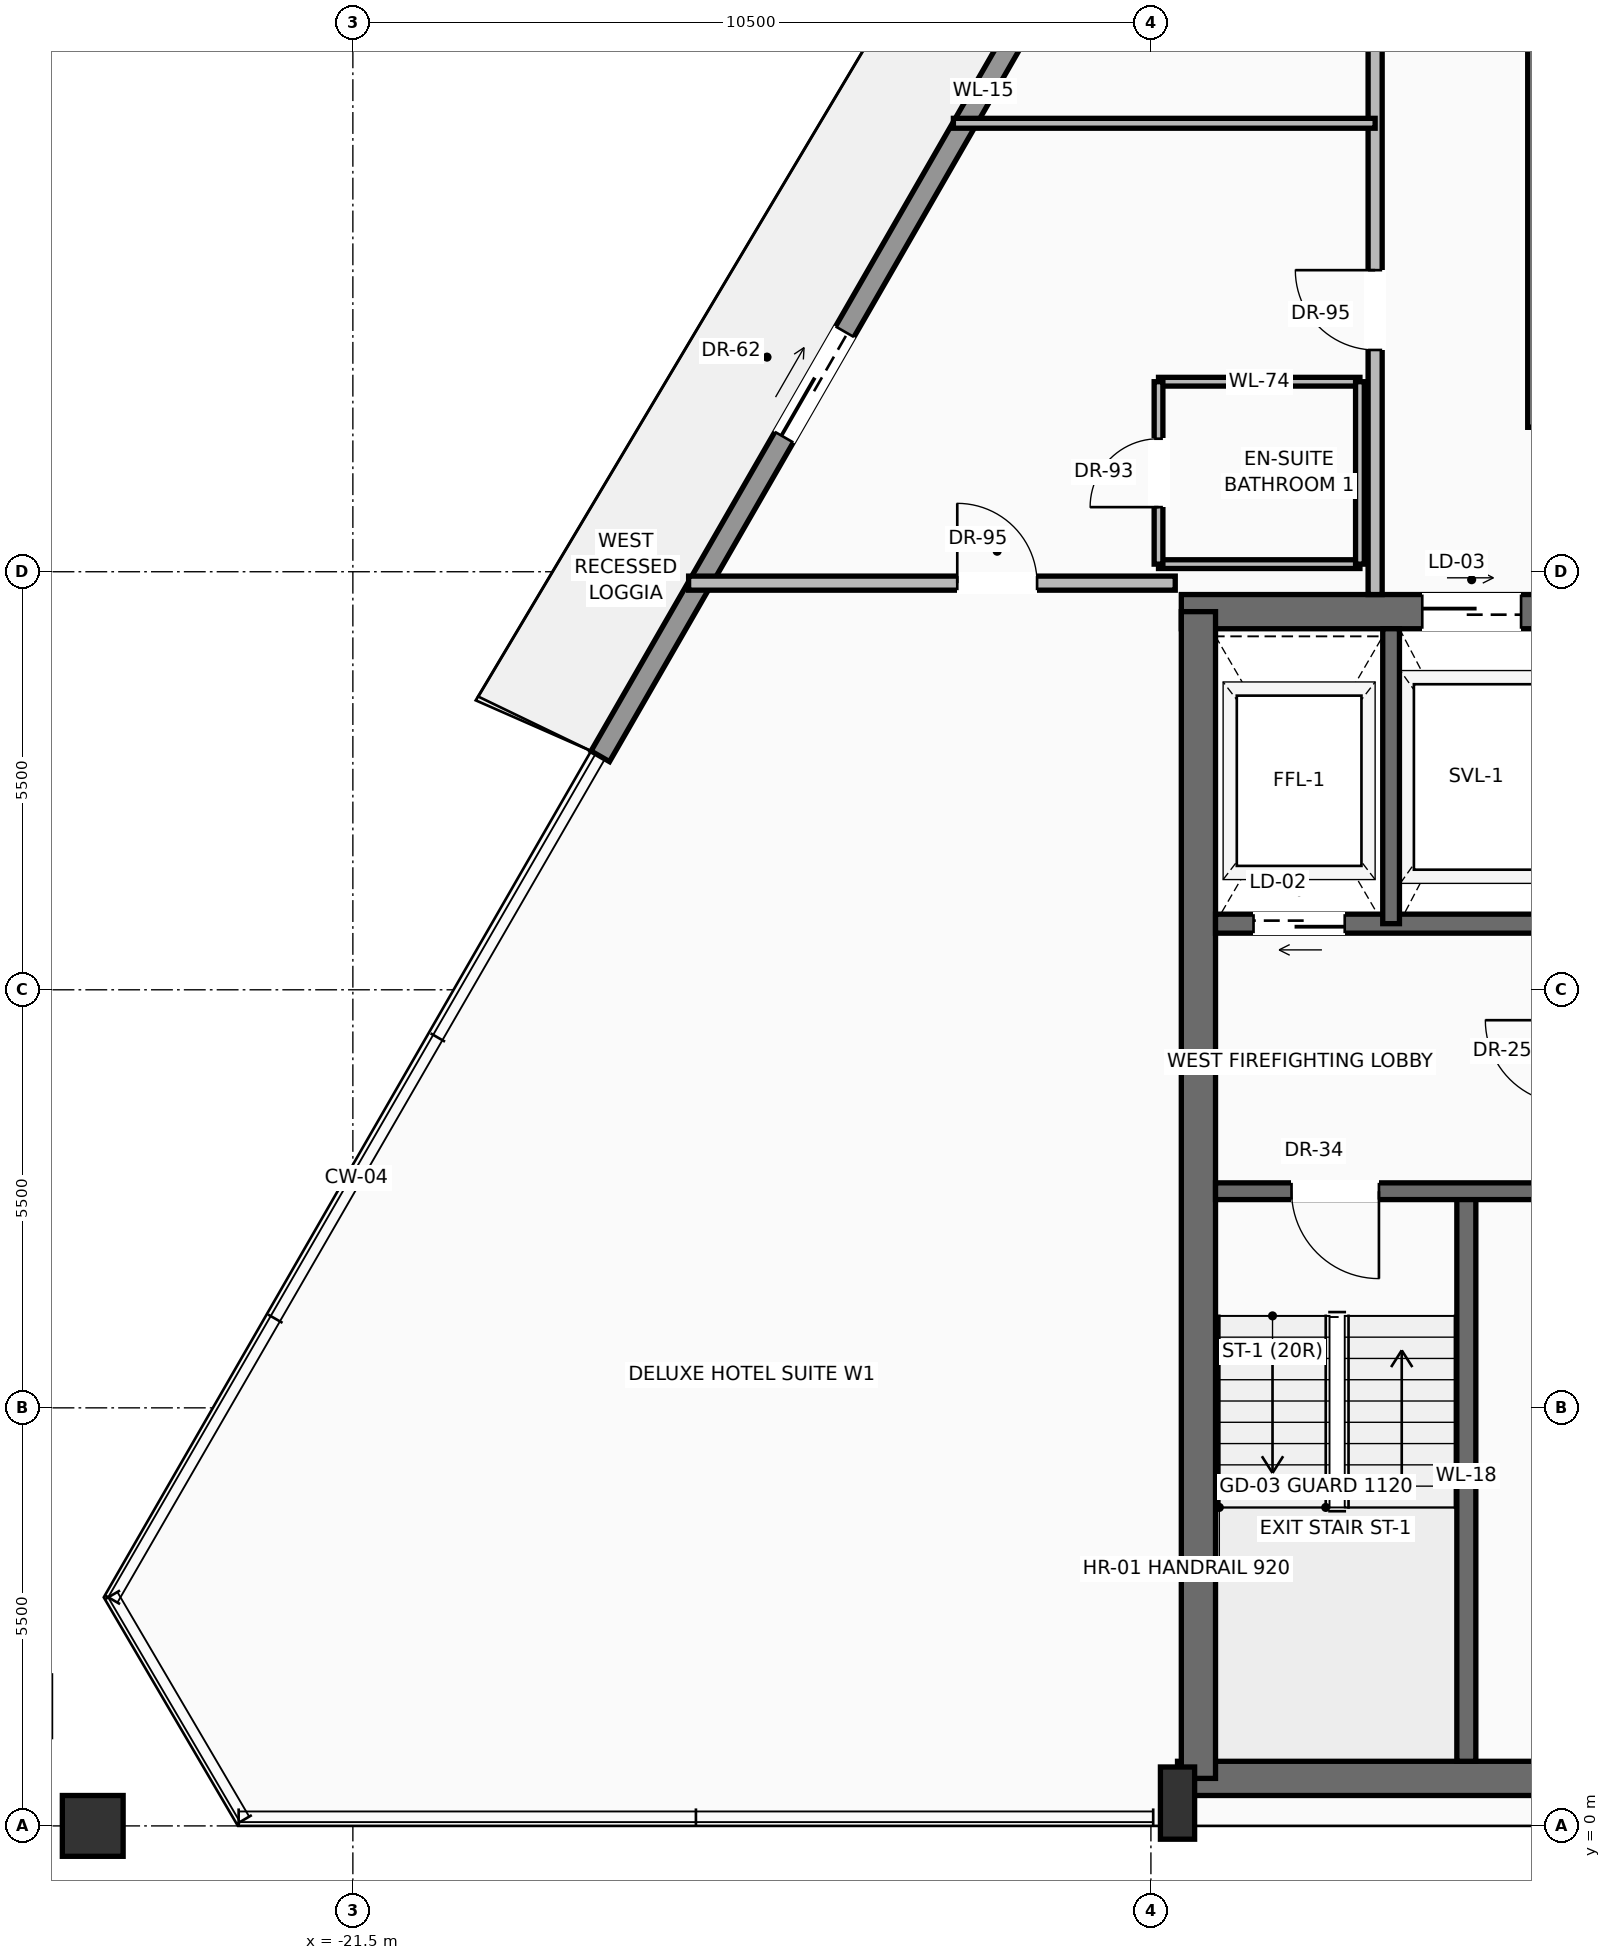
"""IFC4 building model, lengths in metres.
Left out: names, types, materials, properties, quantities, classifications, styles, units other than length and angle.
Written with IfcOpenShell. Run it as: python <this file> out.ifc"""

import sys

from ifc_helpers import new_model, si_unit, direction, frame, frame_2d, origin, origin_2d, place, context, subcontext, project, spatial, rectangle, hollow_rectangle, extrude, source, transform, mapped, element, fill, save


model = new_model("IFC4")
c1 = context("Model", 3, precision=1e-05, world=origin(), true_north=direction((0.0, 1.0)))
c2 = subcontext(c1, "Body", "Model", "MODEL_VIEW")
j1 = project(units=[si_unit("LENGTHUNIT", "METRE"), si_unit("PLANEANGLEUNIT", "RADIAN")], contexts=[c1])
p1 = place(None, origin())
s1 = spatial("IfcSite", under=j1, at=p1, CompositionType="ELEMENT")
p2 = place(p1, origin())
s2 = spatial("IfcBuilding", under=s1, at=p2, CompositionType="ELEMENT")
p3 = place(p2, frame((0.0, 0.0, 283.35)))
s3 = spatial("IfcBuildingStorey", under=s2, at=p3, CompositionType="ELEMENT", Elevation=283.35)
p4 = place(p3, frame((-10.65, 0.625, 0.0), z_axis=(0.0, 0.0, 1.0), x_axis=(1.0, 0.0, 0.0)))
e1 = element("IfcWall", 1, at=p4, inside=s3, PredefinedType="SHEAR", context=c2, shape_type="SweptSolid", body=[
    extrude(rectangle(XDim=21.3, YDim=0.45, at=frame_2d((10.65, 0.0))), origin(), (0.0, 0.0, 1.0), 3.24),
])
p5 = place(p3, frame((-10.6, 15.975, 0.0), z_axis=(0.0, 0.0, 1.0), x_axis=(1.0, 0.0, 0.0)))
e2 = element("IfcWall", 2, at=p5, inside=s3, PredefinedType="SHEAR", context=c2, shape_type="SweptSolid", body=[
    extrude(rectangle(XDim=21.2, YDim=0.45, at=frame_2d((10.6, 0.0))), origin(), (0.0, 0.0, 1.0), 3.24),
])
p6 = place(p5, frame((3.17, 0.0, 0.0)))
e3 = element("IfcOpeningElement", 3, at=p6, cuts=e2, PredefinedType="OPENING", context=c2, shape_type="SweptSolid", body=[
    extrude(rectangle(XDim=1.3, YDim=2.3, at=frame_2d((0.65, 1.15))), frame((0.0, 0.235, 0.0), z_axis=(0.0, -1.0, 0.0), x_axis=(1.0, 0.0, 0.0)), (0.0, 0.0, 1.0), 0.47),
])
p7 = place(p5, frame((9.6, 0.0, 0.0)))
e4 = element("IfcOpeningElement", 4, at=p7, cuts=e2, PredefinedType="OPENING", context=c2, shape_type="SweptSolid", body=[
    extrude(rectangle(XDim=2.0, YDim=2.4, at=frame_2d((1.0, 1.2))), frame((0.0, 0.235, 0.0), z_axis=(0.0, -1.0, 0.0), x_axis=(1.0, 0.0, 0.0)), (0.0, 0.0, 1.0), 0.47),
])
p8 = place(p3, frame((-10.375, 0.625, 0.0), z_axis=(0.0, 0.0, 1.0), x_axis=(0.0, 1.0, 0.0)))
e5 = element("IfcWall", 5, at=p8, inside=s3, PredefinedType="SHEAR", context=c2, shape_type="SweptSolid", body=[
    extrude(rectangle(XDim=15.35, YDim=0.45, at=frame_2d((7.675, 0.0))), origin(), (0.0, 0.0, 1.0), 3.24),
])
m1 = source(origin(), c2, "Body", "SweptSolid", [
    extrude(rectangle(XDim=0.45, YDim=0.95, at=origin_2d()), origin(), (0.0, 0.0, 1.0), 3.45),
])
p9 = place(p3, frame((-10.65, 0.3, 0.0), z_axis=(0.0, 0.0, 1.0), x_axis=(1.0, 0.0, 0.0)))
e6 = element("IfcColumn", 6, at=p9, inside=s3, PredefinedType="PILASTER", context=c2, shape_type="MappedRepresentation", body=[
    mapped(m1, transform((0.0, 0.0, 0.0), scale=1.0)),
])
m2 = source(origin(), c2, "Body", "SweptSolid", [
    extrude(hollow_rectangle(XDim=0.8, YDim=0.8, WallThickness=0.04, at=origin_2d()), origin(), (0.0, 0.0, 1.0), 3.441),
])
p10 = place(p3, frame((-24.923, 0.0, 0.004), z_axis=(0.001915569384, 0.0, 0.999998165295), x_axis=(0.0, 1.0, 0.0)))
e7 = element("IfcColumn", 7, at=p10, inside=s3, PredefinedType="COLUMN", context=c2, shape_type="MappedRepresentation", body=[
    mapped(m2, transform((0.0, 0.0, 0.0), scale=1.0)),
])
m3 = source(origin(), c2, "Body", "SweptSolid", [
    extrude(hollow_rectangle(XDim=0.8, YDim=0.8, WallThickness=0.04, at=origin_2d()), origin(), (0.0, 0.0, 1.0), 3.442),
])
p11 = place(p3, frame((-25.877, 1.574, 0.004), z_axis=(0.012980520503, -0.01624338358, 0.999783805919), x_axis=(0.781201514264, 0.624278939346, 0.0)))
e8 = element("IfcColumn", 8, at=p11, inside=s3, PredefinedType="COLUMN", context=c2, shape_type="MappedRepresentation", body=[
    mapped(m3, transform((0.0, 0.0, 0.0), scale=1.0)),
])
p12 = place(p3, frame((-18.245, 14.072, 0.0), z_axis=(0.0, 0.0, 1.0), x_axis=(0.499006273731, 0.866598372244, 0.0)))
e9 = element("IfcWall", 9, at=p12, inside=s3, PredefinedType="SOLIDWALL", context=c2, shape_type="SweptSolid", body=[
    extrude(rectangle(XDim=20.19, YDim=0.28, at=frame_2d((10.095, 0.0))), origin(), (0.0, 0.0, 1.0), 2.82),
])
p13 = place(p12, frame((4.846, 0.0, 0.0)))
e10 = element("IfcOpeningElement", 10, at=p13, cuts=e9, PredefinedType="OPENING", context=c2, shape_type="SweptSolid", body=[
    extrude(rectangle(XDim=1.6, YDim=2.35, at=frame_2d((0.8, 1.175))), frame((0.0, 0.15, 0.0), z_axis=(0.0, -1.0, 0.0), x_axis=(1.0, 0.0, 0.0)), (0.0, 0.0, 1.0), 0.3),
])
p14 = place(p12, frame((13.729, 0.0, 0.9)))
e11 = element("IfcOpeningElement", 11, at=p14, cuts=e9, PredefinedType="OPENING", context=c2, shape_type="SweptSolid", body=[
    extrude(rectangle(XDim=2.0, YDim=1.75, at=frame_2d((1.0, 0.875))), frame((0.0, 0.15, 0.0), z_axis=(0.0, -1.0, 0.0), x_axis=(1.0, 0.0, 0.0)), (0.0, 0.0, 1.0), 0.3),
])
p15 = place(p3, frame((-6.85, 0.85, 0.0), z_axis=(0.0, 0.0, 1.0), x_axis=(0.0, 1.0, 0.0)))
e12 = element("IfcWall", 12, at=p15, inside=s3, PredefinedType="SOLIDWALL", context=c2, shape_type="SweptSolid", body=[
    extrude(rectangle(XDim=7.5, YDim=0.25, at=frame_2d((3.75, 0.0))), origin(), (0.0, 0.0, 1.0), 3.24),
])
p16 = place(p3, frame((-5.5, 8.35, 0.0), z_axis=(0.0, 0.0, 1.0), x_axis=(-1.0, 0.0, 0.0)))
e13 = element("IfcWall", 13, at=p16, inside=s3, PredefinedType="SOLIDWALL", context=c2, shape_type="SweptSolid", body=[
    extrude(rectangle(XDim=4.65, YDim=0.22, at=frame_2d((2.325, 0.0))), origin(), (0.0, 0.0, 1.0), 3.24),
])
p17 = place(p16, frame((2.5, 0.0, 0.0)))
e14 = element("IfcOpeningElement", 14, at=p17, cuts=e13, PredefinedType="OPENING", context=c2, shape_type="SweptSolid", body=[
    extrude(rectangle(XDim=1.15, YDim=2.2, at=frame_2d((0.575, 1.1))), frame((0.0, 0.12, 0.0), z_axis=(0.0, -1.0, 0.0), x_axis=(1.0, 0.0, 0.0)), (0.0, 0.0, 1.0), 0.24),
])
p18 = place(p3, frame((-5.5, 11.87, 0.0), z_axis=(0.0, 0.0, 1.0), x_axis=(-1.0, 0.0, 0.0)))
e15 = element("IfcWall", 15, at=p18, inside=s3, PredefinedType="SOLIDWALL", context=c2, shape_type="SweptSolid", body=[
    extrude(rectangle(XDim=4.65, YDim=0.25, at=frame_2d((2.325, 0.0))), origin(), (0.0, 0.0, 1.0), 3.24),
])
p19 = place(p18, frame((2.95, 0.0, 0.0)))
e16 = element("IfcOpeningElement", 16, at=p19, cuts=e15, PredefinedType="OPENING", context=c2, shape_type="SweptSolid", body=[
    extrude(rectangle(XDim=1.2, YDim=2.25, at=frame_2d((0.6, 1.125))), frame((0.0, 0.135, 0.0), z_axis=(0.0, -1.0, 0.0), x_axis=(1.0, 0.0, 0.0)), (0.0, 0.0, 1.0), 0.27),
])
p20 = place(p3, frame((-7.84, 11.87, 0.0), z_axis=(0.0, 0.0, 1.0), x_axis=(0.0, 1.0, 0.0)))
e17 = element("IfcWall", 17, at=p20, inside=s3, PredefinedType="SOLIDWALL", context=c2, shape_type="SweptSolid", body=[
    extrude(rectangle(XDim=3.88, YDim=0.22, at=frame_2d((1.94, 0.0))), origin(), (0.0, 0.0, 1.0), 3.24),
])
p21 = place(p3, frame((-5.95, 18.4, 0.0), z_axis=(0.0, 0.0, 1.0), x_axis=(0.0, 1.0, 0.0)))
e18 = element("IfcWall", 18, at=p21, inside=s3, PredefinedType="PARTITIONING", context=c2, shape_type="SweptSolid", body=[
    extrude(rectangle(XDim=8.1, YDim=0.185, at=frame_2d((4.05, 0.0))), origin(), (0.0, 0.0, 1.0), 3.232),
])
p22 = place(p3, frame((-8.05, 16.2, 0.0), z_axis=(0.0, 0.0, 1.0), x_axis=(0.0, 1.0, 0.0)))
e19 = element("IfcWall", 19, at=p22, inside=s3, PredefinedType="PARTITIONING", context=c2, shape_type="SweptSolid", body=[
    extrude(rectangle(XDim=12.4, YDim=0.185, at=frame_2d((6.2, 0.0))), origin(), (0.0, 0.0, 1.0), 3.232),
])
p23 = place(p22, frame((3.218, 0.0, 0.0)))
e20 = element("IfcOpeningElement", 20, at=p23, cuts=e19, PredefinedType="OPENING", context=c2, shape_type="SweptSolid", body=[
    extrude(rectangle(XDim=1.05, YDim=2.25, at=frame_2d((0.525, 1.125))), frame((0.0, 0.103, 0.0), z_axis=(0.0, -1.0, 0.0), x_axis=(1.0, 0.0, 0.0)), (0.0, 0.0, 1.0), 0.205),
])
p24 = place(p22, frame((8.936, 0.0, 0.0)))
e21 = element("IfcOpeningElement", 21, at=p24, cuts=e19, PredefinedType="OPENING", context=c2, shape_type="SweptSolid", body=[
    extrude(rectangle(XDim=1.05, YDim=2.25, at=frame_2d((0.525, 1.125))), frame((0.0, 0.103, 0.0), z_axis=(0.0, -1.0, 0.0), x_axis=(1.0, 0.0, 0.0)), (0.0, 0.0, 1.0), 0.205),
])
p25 = place(p3, frame((-17.083, 16.35, 0.0), z_axis=(0.0, 0.0, 1.0), x_axis=(1.0, 0.0, 0.0)))
e22 = element("IfcWall", 22, at=p25, inside=s3, PredefinedType="PARTITIONING", context=c2, shape_type="SweptSolid", body=[
    extrude(rectangle(XDim=6.403, YDim=0.185, at=frame_2d((3.201, 0.0))), origin(), (0.0, 0.0, 1.0), 3.232),
])
p26 = place(p25, frame((3.535, 0.0, 0.0)))
e23 = element("IfcOpeningElement", 23, at=p26, cuts=e22, PredefinedType="OPENING", context=c2, shape_type="SweptSolid", body=[
    extrude(rectangle(XDim=1.05, YDim=2.25, at=frame_2d((0.525, 1.125))), frame((0.0, 0.103, 0.0), z_axis=(0.0, -1.0, 0.0), x_axis=(1.0, 0.0, 0.0)), (0.0, 0.0, 1.0), 0.205),
])
for number, where, z_axis, x_axis in (
    (24, (-10.9, 16.6, 0.0), (0.0, 0.0, 1.0), (1.0, 0.0, 0.0)),
    (25, (-10.9, 19.0, 0.0), (0.0, 0.0, 1.0), (1.0, 0.0, 0.0)),
):
    element("IfcWall", number, at=place(p3, frame(where, z_axis=z_axis, x_axis=x_axis)), inside=s3, PredefinedType="PARTITIONING", context=c2, shape_type="SweptSolid", body=[
        extrude(rectangle(XDim=2.65, YDim=0.115, at=frame_2d((1.325, 0.0))), origin(), (0.0, 0.0, 1.0), 3.232),
    ])
p27 = place(p3, frame((-10.9, 16.6, 0.0), z_axis=(0.0, 0.0, 1.0), x_axis=(0.0, 1.0, 0.0)))
e26 = element("IfcWall", 26, at=p27, inside=s3, PredefinedType="PARTITIONING", context=c2, shape_type="SweptSolid", body=[
    extrude(rectangle(XDim=2.4, YDim=0.115, at=frame_2d((1.2, 0.0))), origin(), (0.0, 0.0, 1.0), 3.232),
])
p28 = place(p27, frame((0.75, 0.0, 0.0)))
e27 = element("IfcOpeningElement", 27, at=p28, cuts=e26, PredefinedType="OPENING", context=c2, shape_type="SweptSolid", body=[
    extrude(rectangle(XDim=0.9, YDim=2.15, at=frame_2d((0.45, 1.075))), frame((0.0, 0.067, 0.0), z_axis=(0.0, -1.0, 0.0), x_axis=(1.0, 0.0, 0.0)), (0.0, 0.0, 1.0), 0.135),
])
p29 = place(p3, frame((-8.25, 16.6, 0.0), z_axis=(0.0, 0.0, 1.0), x_axis=(0.0, 1.0, 0.0)))
e28 = element("IfcWall", 28, at=p29, inside=s3, PredefinedType="PARTITIONING", context=c2, shape_type="SweptSolid", body=[
    extrude(rectangle(XDim=2.4, YDim=0.115, at=frame_2d((1.2, 0.0))), origin(), (0.0, 0.0, 1.0), 3.232),
])
p30 = place(p3, frame((-13.599, 22.4, 0.0), z_axis=(0.0, 0.0, 1.0), x_axis=(1.0, 0.0, 0.0)))
e29 = element("IfcWall", 29, at=p30, inside=s3, PredefinedType="PARTITIONING", context=c2, shape_type="SweptSolid", body=[
    extrude(rectangle(XDim=5.549, YDim=0.13, at=frame_2d((2.774, 0.0))), origin(), (0.0, 0.0, 1.0), 3.232),
])
m4 = source(origin(), c2, "Body", "SweptSolid", [
    extrude(rectangle(XDim=1.6, YDim=2.35, at=frame_2d((0.8, 1.175))), frame((0.0, 0.025, 0.0), z_axis=(0.0, -1.0, 0.0), x_axis=(1.0, 0.0, 0.0)), (0.0, 0.0, 1.0), 0.05),
])
p31 = place(p13, origin())
e30 = element("IfcDoor", 30, at=p31, inside=s3, OperationType="SLIDING_TO_LEFT", PredefinedType="DOOR", context=c2, shape_type="MappedRepresentation", body=[
    mapped(m4, transform((0.0, 0.0, 0.0), scale=1.0)),
])
fill(e10, e30)
m5 = source(origin(), c2, "Body", "SweptSolid", [
    extrude(rectangle(XDim=1.15, YDim=2.2, at=frame_2d((0.575, 1.1))), frame((0.0, 0.025, 0.0), z_axis=(0.0, -1.0, 0.0), x_axis=(1.0, 0.0, 0.0)), (0.0, 0.0, 1.0), 0.05),
])
p32 = place(p17, origin())
e31 = element("IfcDoor", 31, at=p32, inside=s3, OperationType="SINGLE_SWING_LEFT", PredefinedType="DOOR", context=c2, shape_type="MappedRepresentation", body=[
    mapped(m5, transform((0.0, 0.0, 0.0), scale=1.0)),
])
fill(e14, e31)
m6 = source(origin(), c2, "Body", "SweptSolid", [
    extrude(rectangle(XDim=1.2, YDim=2.25, at=frame_2d((0.6, 1.125))), frame((0.0, 0.025, 0.0), z_axis=(0.0, -1.0, 0.0), x_axis=(1.0, 0.0, 0.0)), (0.0, 0.0, 1.0), 0.05),
])
p33 = place(p19, origin())
e32 = element("IfcDoor", 32, at=p33, inside=s3, OperationType="SLIDING_TO_LEFT", PredefinedType="DOOR", context=c2, shape_type="MappedRepresentation", body=[
    mapped(m6, transform((0.0, 0.0, 0.0), scale=1.0)),
])
fill(e16, e32)
m7 = source(origin(), c2, "Body", "SweptSolid", [
    extrude(rectangle(XDim=1.3, YDim=2.3, at=frame_2d((0.65, 1.15))), frame((0.0, 0.025, 0.0), z_axis=(0.0, -1.0, 0.0), x_axis=(1.0, 0.0, 0.0)), (0.0, 0.0, 1.0), 0.05),
])
p34 = place(p6, origin())
e33 = element("IfcDoor", 33, at=p34, inside=s3, OperationType="SLIDING_TO_RIGHT", PredefinedType="DOOR", context=c2, shape_type="MappedRepresentation", body=[
    mapped(m7, transform((0.0, 0.0, 0.0), scale=1.0)),
])
fill(e3, e33)
m8 = source(origin(), c2, "Body", "SweptSolid", [
    extrude(rectangle(XDim=1.05, YDim=2.25, at=frame_2d((0.525, 1.125))), frame((0.0, 0.025, 0.0), z_axis=(0.0, -1.0, 0.0), x_axis=(1.0, 0.0, 0.0)), (0.0, 0.0, 1.0), 0.05),
])
p35 = place(p26, origin())
e34 = element("IfcDoor", 34, at=p35, inside=s3, OperationType="SINGLE_SWING_LEFT", PredefinedType="DOOR", context=c2, shape_type="MappedRepresentation", body=[
    mapped(m8, transform((0.0, 0.0, 0.0), scale=1.0)),
])
fill(e23, e34)
p36 = place(p23, origin())
e35 = element("IfcDoor", 35, at=p36, inside=s3, OperationType="SINGLE_SWING_RIGHT", PredefinedType="DOOR", context=c2, shape_type="MappedRepresentation", body=[
    mapped(m8, transform((0.0, 0.0, 0.0), scale=1.0)),
])
fill(e20, e35)
m9 = source(origin(), c2, "Body", "SweptSolid", [
    extrude(rectangle(XDim=0.9, YDim=2.15, at=frame_2d((0.45, 1.075))), frame((0.0, 0.025, 0.0), z_axis=(0.0, -1.0, 0.0), x_axis=(1.0, 0.0, 0.0)), (0.0, 0.0, 1.0), 0.05),
])
p37 = place(p28, origin())
e36 = element("IfcDoor", 36, at=p37, inside=s3, OperationType="SINGLE_SWING_LEFT", PredefinedType="DOOR", context=c2, shape_type="MappedRepresentation", body=[
    mapped(m9, transform((0.0, 0.0, 0.0), scale=1.0)),
])
fill(e27, e36)
save(model, sys.argv[1])
